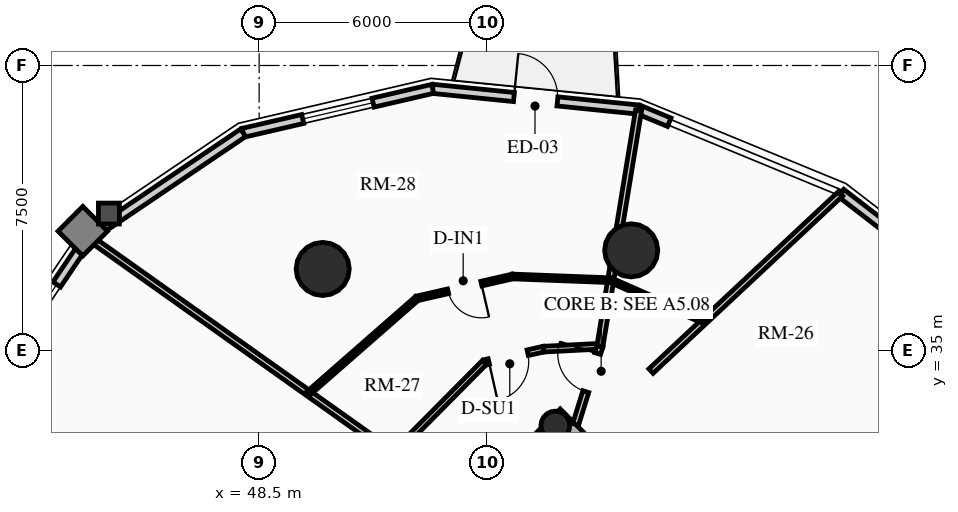
"""IFC4 building model, lengths in metres.
Left out: names, types, materials, properties, quantities, classifications, styles, units other than length and angle.
Written with IfcOpenShell. Run it as: python <this file> out.ifc"""

import sys

from ifc_helpers import new_model, si_unit, direction, frame, frame_2d, origin, origin_2d, place, context, subcontext, project, spatial, rectangle, circle, hollow_circle, extrude, source, transform, mapped, element, fill, save


model = new_model("IFC4")
c1 = context("Model", 3, precision=1e-05, world=origin(), true_north=direction((0.0, 1.0)))
c2 = subcontext(c1, "Body", "Model", "MODEL_VIEW")
j1 = project(units=[si_unit("LENGTHUNIT", "METRE"), si_unit("PLANEANGLEUNIT", "RADIAN")], contexts=[c1])
p1 = place(None, origin())
s1 = spatial("IfcSite", under=j1, at=p1, CompositionType="ELEMENT")
p2 = place(p1, origin())
s2 = spatial("IfcBuilding", under=s1, at=p2, CompositionType="ELEMENT")
p3 = place(p2, frame((0.0, 0.0, 110.89)))
s3 = spatial("IfcBuildingStorey", under=s2, at=p3, CompositionType="ELEMENT", Elevation=110.89)
p4 = place(p3, frame((66.303, 23.263, 0.0), z_axis=(0.0, 0.0, 1.0), x_axis=(-0.707106781187, 0.707106781187, 0.0)))
e1 = element("IfcWall", 1, at=p4, inside=s3, PredefinedType="SHEAR", context=c2, shape_type="SweptSolid", body=[
    extrude(rectangle(XDim=14.2, YDim=0.45, at=frame_2d((7.1, 0.0))), origin(), (0.0, 0.0, 1.0), 2.91),
])
p5 = place(p3, frame((48.856, 25.578, 0.0), z_axis=(0.0, 0.0, 1.0), x_axis=(0.707106781187, 0.707106781187, 0.0)))
e2 = element("IfcWall", 2, at=p5, inside=s3, PredefinedType="SHEAR", context=c2, shape_type="SweptSolid", body=[
    extrude(rectangle(XDim=10.7, YDim=0.45, at=frame_2d((5.35, 0.0))), origin(), (0.0, 0.0, 1.0), 2.91),
])
m1 = source(origin(), c2, "Body", "SweptSolid", [
    extrude(rectangle(XDim=1.5, YDim=2.02, at=frame_2d((0.75, 1.01))), frame((0.0, 0.235, 0.0), z_axis=(0.0, -1.0, 0.0), x_axis=(1.0, 0.0, 0.0)), (0.0, 0.0, 1.0), 0.47),
])
p6 = place(p5, frame((4.6, 0.0, 0.0)))
e3 = element("IfcOpeningElement", 3, at=p6, cuts=e2, PredefinedType="OPENING", context=c2, shape_type="MappedRepresentation", body=[
    mapped(m1, transform((0.0, 0.0, 0.0), x_axis=(1.0, 0.0, 0.0), y_axis=(0.0, 1.0, 0.0), z_axis=(0.0, 0.0, 1.0), scale=1.0)),
])
p7 = place(p3, frame((56.294, 33.024, 0.0), z_axis=(0.0, 0.0, 1.0), x_axis=(0.707106781187, 0.707106781187, 0.0)))
e4 = element("IfcColumn", 4, at=p7, inside=s3, PredefinedType="COLUMN", context=c2, shape_type="SweptSolid", body=[
    extrude(hollow_circle(Radius=0.38, WallThickness=0.032, at=origin_2d()), origin(), (0.0, 0.0, 1.0), 2.91),
])
for number, where, z_axis, x_axis in (
    (5, (58.291, 37.635, 0.0), (0.0, 0.0, 1.0), (1.0, 0.0, 0.0)),
    (6, (50.173, 37.146, 0.0), (0.0, 0.0, 1.0), (1.0, 0.0, 0.0)),
):
    element("IfcColumn", number, at=place(p3, frame(where, z_axis=z_axis, x_axis=x_axis)), inside=s3, PredefinedType="USERDEFINED", context=c2, shape_type="SweptSolid", body=[
        extrude(circle(Radius=0.7, at=origin_2d()), origin(), (0.0, 0.0, 1.0), 2.91),
    ])
p8 = place(p3, frame((63.811, 39.145, 0.0), z_axis=(0.0, 0.0, 1.0), x_axis=(0.791982052206, -0.61054437102, 0.0)))
e7 = element("IfcWall", 7, at=p8, inside=s3, PredefinedType="SOLIDWALL", context=c2, shape_type="SweptSolid", body=[
    extrude(rectangle(XDim=5.942, YDim=0.24, at=frame_2d((2.971, 0.0))), origin(), (0.0, 0.0, 1.0), 2.179),
])
p9 = place(p3, frame((58.487, 41.339, 0.0), z_axis=(0.0, 0.0, 1.0), x_axis=(0.924556017656, -0.381046152345, 0.0)))
e8 = element("IfcWall", 8, at=p9, inside=s3, PredefinedType="SOLIDWALL", context=c2, shape_type="SweptSolid", body=[
    extrude(rectangle(XDim=0.87, YDim=0.24, at=frame_2d((0.435, 0.0))), origin(), (0.0, 0.0, 1.0), 2.179),
])
p10 = place(p3, frame((53.067, 41.885, 0.0), z_axis=(0.0, 0.0, 1.0), x_axis=(0.994971754311, -0.10015591906, 0.0)))
e9 = element("IfcWall", 9, at=p10, inside=s3, PredefinedType="SOLIDWALL", context=c2, shape_type="SweptSolid", body=[
    extrude(rectangle(XDim=5.448, YDim=0.24, at=frame_2d((2.724, 0.0))), origin(), (0.0, 0.0, 1.0), 2.179),
])
m2 = source(origin(), c2, "Body", "SweptSolid", [
    extrude(rectangle(XDim=1.15, YDim=2.005, at=frame_2d((0.575, 1.002))), frame((0.0, 0.13, 0.0), z_axis=(0.0, -1.0, 0.0), x_axis=(1.0, 0.0, 0.0)), (0.0, 0.0, 1.0), 0.26),
])
p11 = place(p10, frame((2.149, 0.0, 0.0)))
e10 = element("IfcOpeningElement", 10, at=p11, cuts=e9, PredefinedType="OPENING", context=c2, shape_type="MappedRepresentation", body=[
    mapped(m2, transform((0.0, 0.0, 0.0), x_axis=(1.0, 0.0, 0.0), y_axis=(0.0, 1.0, 0.0), z_axis=(0.0, 0.0, 1.0), scale=1.0)),
])
p12 = place(p3, frame((48.08, 40.729, 0.0), z_axis=(0.0, 0.0, 1.0), x_axis=(0.974165631126, 0.225834725257, 0.0)))
e11 = element("IfcWall", 11, at=p12, inside=s3, PredefinedType="SOLIDWALL", context=c2, shape_type="SweptSolid", body=[
    extrude(rectangle(XDim=5.119, YDim=0.24, at=frame_2d((2.56, 0.0))), origin(), (0.0, 0.0, 1.0), 2.179),
])
m3 = source(origin(), c2, "Body", "SweptSolid", [
    extrude(rectangle(XDim=1.9, YDim=1.35, at=frame_2d((0.95, 0.675))), frame((0.0, 0.13, 0.0), z_axis=(0.0, -1.0, 0.0), x_axis=(1.0, 0.0, 0.0)), (0.0, 0.0, 1.0), 0.26),
])
p13 = place(p12, frame((1.609, 0.0, 0.65)))
e12 = element("IfcOpeningElement", 12, at=p13, cuts=e11, PredefinedType="OPENING", context=c2, shape_type="MappedRepresentation", body=[
    mapped(m3, transform((0.0, 0.0, 0.0), x_axis=(1.0, 0.0, 0.0), y_axis=(0.0, 1.0, 0.0), z_axis=(0.0, 0.0, 1.0), scale=1.0)),
])
p14 = place(p3, frame((44.015, 37.985, 0.0), z_axis=(0.0, 0.0, 1.0), x_axis=(0.828781148131, 0.559572880421, 0.0)))
e13 = element("IfcWall", 13, at=p14, inside=s3, PredefinedType="SOLIDWALL", context=c2, shape_type="SweptSolid", body=[
    extrude(rectangle(XDim=4.905, YDim=0.24, at=frame_2d((2.452, 0.0))), origin(), (0.0, 0.0, 1.0), 2.179),
])
p15 = place(p3, frame((41.271, 33.92, 0.0), z_axis=(0.0, 0.0, 1.0), x_axis=(0.559572880421, 0.828781148131, 0.0)))
e14 = element("IfcWall", 14, at=p15, inside=s3, PredefinedType="SOLIDWALL", context=c2, shape_type="SweptSolid", body=[
    extrude(rectangle(XDim=4.905, YDim=0.24, at=frame_2d((2.452, 0.0))), origin(), (0.0, 0.0, 1.0), 2.179),
])
p16 = place(p15, frame((1.502, 0.0, 0.65)))
e15 = element("IfcOpeningElement", 15, at=p16, cuts=e14, PredefinedType="OPENING", context=c2, shape_type="MappedRepresentation", body=[
    mapped(m3, transform((0.0, 0.0, 0.0), x_axis=(1.0, 0.0, 0.0), y_axis=(0.0, 1.0, 0.0), z_axis=(0.0, 0.0, 1.0), scale=1.0)),
])
p17 = place(p3, frame((57.467, 35.111, 0.0), z_axis=(0.0, 0.0, 1.0), x_axis=(-0.998691757323, -0.051134859488, 0.0)))
e16 = element("IfcWall", 16, at=p17, inside=s3, PredefinedType="PARTITIONING", context=c2, shape_type="SweptSolid", body=[
    extrude(rectangle(XDim=1.485, YDim=0.15, at=frame_2d((0.742, 0.0))), origin(), (0.0, 0.0, 1.0), 2.225),
])
p18 = place(p3, frame((55.984, 35.035, 0.0), z_axis=(0.0, 0.0, 1.0), x_axis=(-0.975290305708, -0.22092718165, 0.0)))
e17 = element("IfcWall", 17, at=p18, inside=s3, PredefinedType="PARTITIONING", context=c2, shape_type="SweptSolid", body=[
    extrude(rectangle(XDim=1.597, YDim=0.15, at=frame_2d((0.798, 0.0))), origin(), (0.0, 0.0, 1.0), 2.225),
])
m4 = source(origin(), c2, "Body", "SweptSolid", [
    extrude(rectangle(XDim=1.05, YDim=2.015, at=frame_2d((0.525, 1.007))), frame((0.0, 0.085, 0.0), z_axis=(0.0, -1.0, 0.0), x_axis=(1.0, 0.0, 0.0)), (0.0, 0.0, 1.0), 0.17),
])
p19 = place(p18, frame((0.427, 0.0, 0.0)))
e18 = element("IfcOpeningElement", 18, at=p19, cuts=e17, PredefinedType="OPENING", context=c2, shape_type="MappedRepresentation", body=[
    mapped(m4, transform((0.0, 0.0, 0.0), x_axis=(1.0, 0.0, 0.0), y_axis=(0.0, 1.0, 0.0), z_axis=(0.0, 0.0, 1.0), scale=1.0)),
])
p20 = place(p3, frame((54.427, 34.683, 0.0), z_axis=(0.0, 0.0, 1.0), x_axis=(-0.704178989986, -0.710022499687, 0.0)))
e19 = element("IfcWall", 19, at=p20, inside=s3, PredefinedType="PARTITIONING", context=c2, shape_type="SweptSolid", body=[
    extrude(rectangle(XDim=3.384, YDim=0.15, at=frame_2d((1.692, 0.0))), origin(), (0.0, 0.0, 1.0), 2.225),
])
p21 = place(p3, frame((58.812, 34.458, 0.0), z_axis=(0.0, 0.0, 1.0), x_axis=(0.73022196979, 0.683209978584, 0.0)))
e20 = element("IfcWall", 20, at=p21, inside=s3, PredefinedType="PARTITIONING", context=c2, shape_type="SweptSolid", body=[
    extrude(rectangle(XDim=6.834, YDim=0.16, at=frame_2d((3.417, 0.0))), origin(), (0.0, 0.0, 1.0), 2.179),
])
p22 = place(p3, frame((57.467, 35.111, 0.0), z_axis=(0.0, 0.0, 1.0), x_axis=(0.161711214096, 0.98683812413, 0.0)))
e21 = element("IfcWall", 21, at=p22, inside=s3, PredefinedType="PARTITIONING", context=c2, shape_type="SweptSolid", body=[
    extrude(rectangle(XDim=6.291, YDim=0.16, at=frame_2d((3.146, 0.0))), origin(), (0.0, 0.0, 1.0), 2.179),
])
p23 = place(p3, frame((52.043, 32.28, 0.0), z_axis=(0.0, 0.0, 1.0), x_axis=(-0.81534487613, 0.578975589268, 0.0)))
e22 = element("IfcWall", 22, at=p23, inside=s3, PredefinedType="PARTITIONING", context=c2, shape_type="SweptSolid", body=[
    extrude(rectangle(XDim=9.829, YDim=0.16, at=frame_2d((4.915, 0.0))), origin(), (0.0, 0.0, 1.0), 2.179),
])
p24 = place(p3, frame((56.828, 33.056, 0.0), z_axis=(0.0, 0.0, 1.0), x_axis=(0.296730996083, 0.954961107042, 0.0)))
e23 = element("IfcWall", 23, at=p24, inside=s3, PredefinedType="PARTITIONING", context=c2, shape_type="SweptSolid", body=[
    extrude(rectangle(XDim=2.152, YDim=0.16, at=frame_2d((1.076, 0.0))), origin(), (0.0, 0.0, 1.0), 2.225),
])
m5 = source(origin(), c2, "Body", "SweptSolid", [
    extrude(rectangle(XDim=1.05, YDim=2.015, at=frame_2d((0.525, 1.007))), frame((0.0, 0.09, 0.0), z_axis=(0.0, -1.0, 0.0), x_axis=(1.0, 0.0, 0.0)), (0.0, 0.0, 1.0), 0.18),
])
p25 = place(p24, frame((0.902, 0.0, 0.0)))
e24 = element("IfcOpeningElement", 24, at=p25, cuts=e23, PredefinedType="OPENING", context=c2, shape_type="MappedRepresentation", body=[
    mapped(m5, transform((0.0, 0.0, 0.0), x_axis=(1.0, 0.0, 0.0), y_axis=(0.0, 1.0, 0.0), z_axis=(0.0, 0.0, 1.0), scale=1.0)),
])
p26 = place(p3, frame((60.209, 35.766, 0.0), z_axis=(0.0, 0.0, 1.0), x_axis=(-0.914932611268, 0.403606636267, 0.0)))
e25 = element("IfcWall", 25, at=p26, inside=s3, PredefinedType="PARTITIONING", context=c2, shape_type="SweptSolid", body=[
    extrude(rectangle(XDim=2.686, YDim=0.125, at=frame_2d((1.343, 0.0))), origin(), (0.0, 0.0, 1.0), 2.225),
])
p27 = place(p3, frame((57.752, 36.85, 0.0), z_axis=(0.0, 0.0, 1.0), x_axis=(-0.999279468675, 0.037954492291, 0.0)))
e26 = element("IfcWall", 26, at=p27, inside=s3, PredefinedType="PARTITIONING", context=c2, shape_type="SweptSolid", body=[
    extrude(rectangle(XDim=2.586, YDim=0.125, at=frame_2d((1.293, 0.0))), origin(), (0.0, 0.0, 1.0), 2.655),
])
p28 = place(p3, frame((55.168, 36.948, 0.0), z_axis=(0.0, 0.0, 1.0), x_axis=(-0.974677367116, -0.223615808993, 0.0)))
e27 = element("IfcWall", 27, at=p28, inside=s3, PredefinedType="PARTITIONING", context=c2, shape_type="SweptSolid", body=[
    extrude(rectangle(XDim=2.581, YDim=0.125, at=frame_2d((1.291, 0.0))), origin(), (0.0, 0.0, 1.0), 2.225),
])
m6 = source(origin(), c2, "Body", "SweptSolid", [
    extrude(rectangle(XDim=0.9, YDim=2.005, at=frame_2d((0.45, 1.002))), frame((0.0, 0.073, 0.0), z_axis=(0.0, -1.0, 0.0), x_axis=(1.0, 0.0, 0.0)), (0.0, 0.0, 1.0), 0.145),
])
p29 = place(p28, frame((0.841, 0.0, 0.0)))
e28 = element("IfcOpeningElement", 28, at=p29, cuts=e27, PredefinedType="OPENING", context=c2, shape_type="MappedRepresentation", body=[
    mapped(m6, transform((0.0, 0.0, 0.0), x_axis=(1.0, 0.0, 0.0), y_axis=(0.0, 1.0, 0.0), z_axis=(0.0, 0.0, 1.0), scale=1.0)),
])
p30 = place(p3, frame((52.652, 36.371, 0.0), z_axis=(0.0, 0.0, 1.0), x_axis=(-0.752401146533, -0.658705180408, 0.0)))
e29 = element("IfcWall", 29, at=p30, inside=s3, PredefinedType="PARTITIONING", context=c2, shape_type="SweptSolid", body=[
    extrude(rectangle(XDim=3.791, YDim=0.125, at=frame_2d((1.896, 0.0))), origin(), (0.0, 0.0, 1.0), 2.225),
])
m7 = source(origin(), c2, "Body", "SweptSolid", [
    extrude(rectangle(XDim=1.15, YDim=2.005, at=frame_2d((0.575, 1.002))), frame((0.0, 0.025, 0.0), z_axis=(0.0, -1.0, 0.0), x_axis=(1.0, 0.0, 0.0)), (0.0, 0.0, 1.0), 0.05),
])
p31 = place(p11, origin())
e30 = element("IfcDoor", 30, at=p31, inside=s3, OperationType="SINGLE_SWING_LEFT", PredefinedType="DOOR", context=c2, shape_type="MappedRepresentation", body=[
    mapped(m7, transform((0.0, 0.0, 0.0), x_axis=(1.0, 0.0, 0.0), y_axis=(0.0, 1.0, 0.0), z_axis=(0.0, 0.0, 1.0), scale=1.0)),
])
fill(e10, e30)
m8 = source(origin(), c2, "Body", "SweptSolid", [
    extrude(rectangle(XDim=1.9, YDim=1.35, at=frame_2d((0.95, 0.675))), frame((0.0, 0.03, 0.0), z_axis=(0.0, -1.0, 0.0), x_axis=(1.0, 0.0, 0.0)), (0.0, 0.0, 1.0), 0.06),
])
p32 = place(p13, origin())
e31 = element("IfcWindow", 31, at=p32, inside=s3, PartitioningType="DOUBLE_PANEL_VERTICAL", PredefinedType="WINDOW", context=c2, shape_type="MappedRepresentation", body=[
    mapped(m8, transform((0.0, 0.0, 0.0), x_axis=(1.0, 0.0, 0.0), y_axis=(0.0, 1.0, 0.0), z_axis=(0.0, 0.0, 1.0), scale=1.0)),
])
fill(e12, e31)
p33 = place(p16, origin())
e32 = element("IfcWindow", 32, at=p33, inside=s3, PartitioningType="DOUBLE_PANEL_VERTICAL", PredefinedType="WINDOW", context=c2, shape_type="MappedRepresentation", body=[
    mapped(m8, transform((0.0, 0.0, 0.0), x_axis=(1.0, 0.0, 0.0), y_axis=(0.0, 1.0, 0.0), z_axis=(0.0, 0.0, 1.0), scale=1.0)),
])
fill(e15, e32)
m9 = source(origin(), c2, "Body", "SweptSolid", [
    extrude(rectangle(XDim=1.05, YDim=2.015, at=frame_2d((0.525, 1.007))), frame((0.0, 0.025, 0.0), z_axis=(0.0, -1.0, 0.0), x_axis=(1.0, 0.0, 0.0)), (0.0, 0.0, 1.0), 0.05),
])
p34 = place(p25, origin())
e33 = element("IfcDoor", 33, at=p34, inside=s3, OperationType="SINGLE_SWING_RIGHT", PredefinedType="DOOR", context=c2, shape_type="MappedRepresentation", body=[
    mapped(m9, transform((0.0, 0.0, 0.0), x_axis=(1.0, 0.0, 0.0), y_axis=(0.0, 1.0, 0.0), z_axis=(0.0, 0.0, 1.0), scale=1.0)),
])
fill(e24, e33)
p35 = place(p19, origin())
e34 = element("IfcDoor", 34, at=p35, inside=s3, OperationType="SINGLE_SWING_RIGHT", PredefinedType="DOOR", context=c2, shape_type="MappedRepresentation", body=[
    mapped(m9, transform((0.0, 0.0, 0.0), x_axis=(1.0, 0.0, 0.0), y_axis=(0.0, 1.0, 0.0), z_axis=(0.0, 0.0, 1.0), scale=1.0)),
])
fill(e18, e34)
m10 = source(origin(), c2, "Body", "SweptSolid", [
    extrude(rectangle(XDim=0.9, YDim=2.005, at=frame_2d((0.45, 1.002))), frame((0.0, 0.025, 0.0), z_axis=(0.0, -1.0, 0.0), x_axis=(1.0, 0.0, 0.0)), (0.0, 0.0, 1.0), 0.05),
])
p36 = place(p29, origin())
e35 = element("IfcDoor", 35, at=p36, inside=s3, OperationType="SINGLE_SWING_LEFT", PredefinedType="DOOR", context=c2, shape_type="MappedRepresentation", body=[
    mapped(m10, transform((0.0, 0.0, 0.0), x_axis=(1.0, 0.0, 0.0), y_axis=(0.0, 1.0, 0.0), z_axis=(0.0, 0.0, 1.0), scale=1.0)),
])
fill(e28, e35)
save(model, sys.argv[1])
